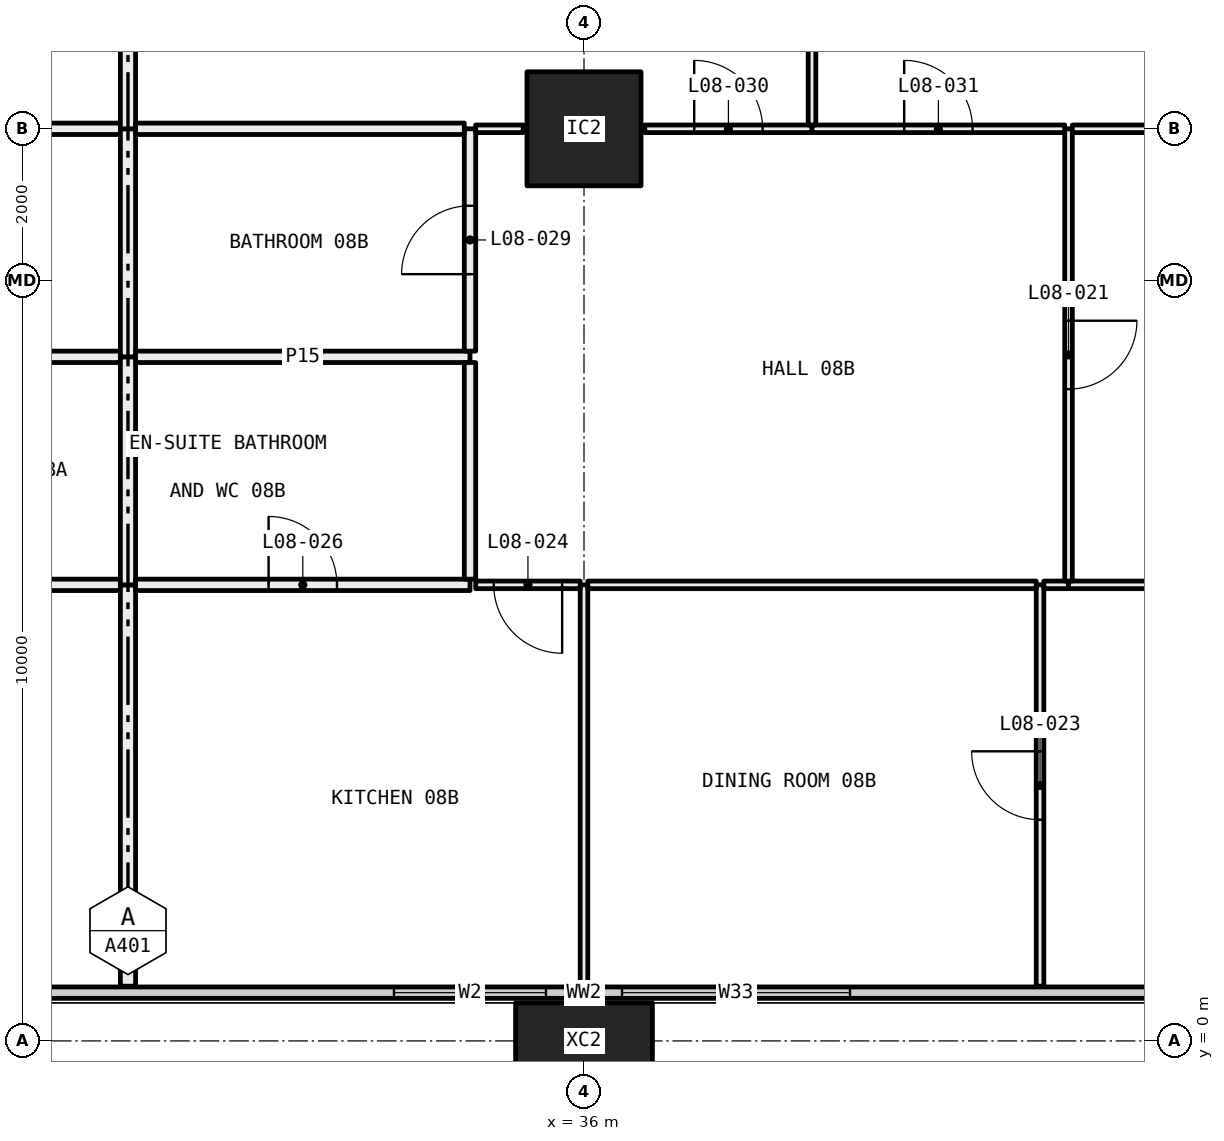
"""IFC4 building model, lengths in metres.
Left out: names, types, materials, properties, quantities, classifications, styles, units other than length and angle.
Written with IfcOpenShell. Run it as: python <this file> out.ifc"""

import sys

from ifc_helpers import new_model, si_unit, direction, frame, frame_2d, origin, origin_2d, place, context, subcontext, project, spatial, rectangle, hollow_rectangle, extrude, element, fill, save


model = new_model("IFC4")
c1 = context("Model", 3, precision=1e-05, world=origin(), true_north=direction((0.0, 1.0)))
c2 = subcontext(c1, "Body", "Model", "MODEL_VIEW")
j1 = project(units=[si_unit("LENGTHUNIT", "METRE"), si_unit("PLANEANGLEUNIT", "RADIAN")], contexts=[c1])
p1 = place(None, origin())
s1 = spatial("IfcSite", under=j1, at=p1, CompositionType="ELEMENT")
p2 = place(p1, origin())
s2 = spatial("IfcBuilding", under=s1, at=p2, CompositionType="ELEMENT")
p3 = place(p2, frame((0.0, 0.0, 40.35)))
s3 = spatial("IfcBuildingStorey", under=s2, at=p3, CompositionType="ELEMENT", Elevation=40.35)
p4 = place(p3, frame((36.0, 0.0, -0.4), z_axis=(0.0, 0.0, 1.0), x_axis=(1.0, 0.0, 0.0)))
e1 = element("IfcColumn", 1, at=p4, inside=s3, PredefinedType="COLUMN", context=c2, shape_type="SweptSolid", body=[
    extrude(hollow_rectangle(XDim=1.8, YDim=1.0, WallThickness=0.07, at=origin_2d()), origin(), (0.0, 0.0, 1.0), 3.45),
])
p5 = place(p3, frame((36.0, 12.0, 0.0), z_axis=(0.0, 0.0, 1.0), x_axis=(1.0, 0.0, 0.0)))
e2 = element("IfcColumn", 2, at=p5, inside=s3, PredefinedType="COLUMN", context=c2, shape_type="SweptSolid", body=[
    extrude(hollow_rectangle(XDim=1.5, YDim=1.5, WallThickness=0.065, at=origin_2d()), origin(), (0.0, 0.0, 1.0), 3.05),
])
p6 = place(p3, frame((6.56, 0.635, 0.0), z_axis=(0.0, 0.0, 1.0), x_axis=(1.0, 0.0, 0.0)))
e3 = element("IfcWall", 3, at=p6, inside=s3, PredefinedType="ELEMENTEDWALL", context=c2, shape_type="SweptSolid", body=[
    extrude(rectangle(XDim=58.88, YDim=0.15, at=frame_2d((29.44, 0.0))), origin(), (0.0, 0.0, 1.0), 3.05),
])
p7 = place(p6, frame((0.44, 0.0, 0.45)))
e4 = element("IfcOpeningElement", 4, at=p7, cuts=e3, PredefinedType="OPENING", context=c2, shape_type="SweptSolid", body=[
    extrude(rectangle(XDim=4.5, YDim=2.55, at=frame_2d((2.25, 1.275))), frame((0.0, 0.085, 0.0), z_axis=(0.0, -1.0, 0.0), x_axis=(1.0, 0.0, 0.0)), (0.0, 0.0, 1.0), 0.17),
])
p8 = place(p6, frame((5.94, 0.0, 0.45)))
e5 = element("IfcOpeningElement", 5, at=p8, cuts=e3, PredefinedType="OPENING", context=c2, shape_type="SweptSolid", body=[
    extrude(rectangle(XDim=3.0, YDim=2.55, at=frame_2d((1.5, 1.275))), frame((0.0, 0.085, 0.0), z_axis=(0.0, -1.0, 0.0), x_axis=(1.0, 0.0, 0.0)), (0.0, 0.0, 1.0), 0.17),
])
p9 = place(p6, frame((13.94, 0.0, 0.45)))
e6 = element("IfcOpeningElement", 6, at=p9, cuts=e3, PredefinedType="OPENING", context=c2, shape_type="SweptSolid", body=[
    extrude(rectangle(XDim=3.0, YDim=2.55, at=frame_2d((1.5, 1.275))), frame((0.0, 0.085, 0.0), z_axis=(0.0, -1.0, 0.0), x_axis=(1.0, 0.0, 0.0)), (0.0, 0.0, 1.0), 0.17),
])
p10 = place(p6, frame((17.94, 0.0, 0.45)))
e7 = element("IfcOpeningElement", 7, at=p10, cuts=e3, PredefinedType="OPENING", context=c2, shape_type="SweptSolid", body=[
    extrude(rectangle(XDim=3.0, YDim=2.55, at=frame_2d((1.5, 1.275))), frame((0.0, 0.085, 0.0), z_axis=(0.0, -1.0, 0.0), x_axis=(1.0, 0.0, 0.0)), (0.0, 0.0, 1.0), 0.17),
])
p11 = place(p6, frame((26.94, 0.0, 0.45)))
e8 = element("IfcOpeningElement", 8, at=p11, cuts=e3, PredefinedType="OPENING", context=c2, shape_type="SweptSolid", body=[
    extrude(rectangle(XDim=2.0, YDim=2.55, at=frame_2d((1.0, 1.275))), frame((0.0, 0.085, 0.0), z_axis=(0.0, -1.0, 0.0), x_axis=(1.0, 0.0, 0.0)), (0.0, 0.0, 1.0), 0.17),
])
p12 = place(p6, frame((29.94, 0.0, 0.45)))
e9 = element("IfcOpeningElement", 9, at=p12, cuts=e3, PredefinedType="OPENING", context=c2, shape_type="SweptSolid", body=[
    extrude(rectangle(XDim=3.0, YDim=2.55, at=frame_2d((1.5, 1.275))), frame((0.0, 0.085, 0.0), z_axis=(0.0, -1.0, 0.0), x_axis=(1.0, 0.0, 0.0)), (0.0, 0.0, 1.0), 0.17),
])
p13 = place(p6, frame((37.94, 0.0, 0.45)))
e10 = element("IfcOpeningElement", 10, at=p13, cuts=e3, PredefinedType="OPENING", context=c2, shape_type="SweptSolid", body=[
    extrude(rectangle(XDim=3.0, YDim=2.55, at=frame_2d((1.5, 1.275))), frame((0.0, 0.085, 0.0), z_axis=(0.0, -1.0, 0.0), x_axis=(1.0, 0.0, 0.0)), (0.0, 0.0, 1.0), 0.17),
])
p14 = place(p6, frame((41.94, 0.0, 0.45)))
e11 = element("IfcOpeningElement", 11, at=p14, cuts=e3, PredefinedType="OPENING", context=c2, shape_type="SweptSolid", body=[
    extrude(rectangle(XDim=3.0, YDim=2.55, at=frame_2d((1.5, 1.275))), frame((0.0, 0.085, 0.0), z_axis=(0.0, -1.0, 0.0), x_axis=(1.0, 0.0, 0.0)), (0.0, 0.0, 1.0), 0.17),
])
p15 = place(p6, frame((50.94, 0.0, 0.45)))
e12 = element("IfcOpeningElement", 12, at=p15, cuts=e3, PredefinedType="OPENING", context=c2, shape_type="SweptSolid", body=[
    extrude(rectangle(XDim=2.0, YDim=2.55, at=frame_2d((1.0, 1.275))), frame((0.0, 0.085, 0.0), z_axis=(0.0, -1.0, 0.0), x_axis=(1.0, 0.0, 0.0)), (0.0, 0.0, 1.0), 0.17),
])
p16 = place(p6, frame((53.94, 0.0, 0.45)))
e13 = element("IfcOpeningElement", 13, at=p16, cuts=e3, PredefinedType="OPENING", context=c2, shape_type="SweptSolid", body=[
    extrude(rectangle(XDim=4.5, YDim=2.55, at=frame_2d((2.25, 1.275))), frame((0.0, 0.085, 0.0), z_axis=(0.0, -1.0, 0.0), x_axis=(1.0, 0.0, 0.0)), (0.0, 0.0, 1.0), 0.17),
])
p17 = place(p3, frame((29.9, 6.0, 0.0), z_axis=(0.0, 0.0, 1.0), x_axis=(-1.0, 0.0, 0.0)))
e14 = element("IfcWall", 14, at=p17, inside=s3, PredefinedType="PARTITIONING", context=c2, shape_type="SweptSolid", body=[
    extrude(rectangle(XDim=4.4, YDim=0.15, at=frame_2d((2.2, 0.0))), origin(), (0.0, 0.0, 1.0), 3.05),
])
p18 = place(p3, frame((30.0, 0.72, 0.0), z_axis=(0.0, 0.0, 1.0), x_axis=(0.0, 1.0, 0.0)))
e15 = element("IfcWall", 15, at=p18, inside=s3, PredefinedType="PARTITIONING", context=c2, shape_type="SweptSolid", body=[
    extrude(rectangle(XDim=5.28, YDim=0.2, at=frame_2d((2.64, 0.0))), origin(), (0.0, 0.0, 1.0), 3.05),
])
p19 = place(p3, frame((29.9, 9.0, 0.0), z_axis=(0.0, 0.0, 1.0), x_axis=(-1.0, 0.0, 0.0)))
e16 = element("IfcWall", 16, at=p19, inside=s3, PredefinedType="PARTITIONING", context=c2, shape_type="SweptSolid", body=[
    extrude(rectangle(XDim=4.325, YDim=0.15, at=frame_2d((2.163, 0.0))), origin(), (0.0, 0.0, 1.0), 3.05),
])
p20 = place(p3, frame((30.0, 6.0, 0.0), z_axis=(0.0, 0.0, 1.0), x_axis=(0.0, 1.0, 0.0)))
e17 = element("IfcWall", 17, at=p20, inside=s3, PredefinedType="PARTITIONING", context=c2, shape_type="SweptSolid", body=[
    extrude(rectangle(XDim=3.0, YDim=0.2, at=frame_2d((1.5, 0.0))), origin(), (0.0, 0.0, 1.0), 3.05),
])
p21 = place(p3, frame((29.9, 12.0, 0.0), z_axis=(0.0, 0.0, 1.0), x_axis=(-1.0, 0.0, 0.0)))
e18 = element("IfcWall", 18, at=p21, inside=s3, PredefinedType="PARTITIONING", context=c2, shape_type="SweptSolid", body=[
    extrude(rectangle(XDim=4.325, YDim=0.15, at=frame_2d((2.163, 0.0))), origin(), (0.0, 0.0, 1.0), 2.45),
])
p22 = place(p3, frame((30.0, 9.0, 0.0), z_axis=(0.0, 0.0, 1.0), x_axis=(0.0, 1.0, 0.0)))
e19 = element("IfcWall", 19, at=p22, inside=s3, PredefinedType="PARTITIONING", context=c2, shape_type="SweptSolid", body=[
    extrude(rectangle(XDim=3.0, YDim=0.2, at=frame_2d((1.5, 0.0))), origin(), (0.0, 0.0, 1.0), 2.45),
])
p23 = place(p3, frame((30.0, 12.0, 0.0), z_axis=(0.0, 0.0, 1.0), x_axis=(0.0, 1.0, 0.0)))
e20 = element("IfcWall", 20, at=p23, inside=s3, PredefinedType="PARTITIONING", context=c2, shape_type="SweptSolid", body=[
    extrude(rectangle(XDim=6.0, YDim=0.2, at=frame_2d((3.0, 0.0))), origin(), (0.0, 0.0, 1.0), 2.45),
])
p24 = place(p3, frame((36.0, 0.72, 0.0), z_axis=(0.0, 0.0, 1.0), x_axis=(0.0, 1.0, 0.0)))
e21 = element("IfcWall", 21, at=p24, inside=s3, PredefinedType="PARTITIONING", context=c2, shape_type="SweptSolid", body=[
    extrude(rectangle(XDim=5.28, YDim=0.1, at=frame_2d((2.64, 0.0))), origin(), (0.0, 0.0, 1.0), 2.45),
])
p25 = place(p3, frame((34.5, 6.0, 0.0), z_axis=(0.0, 0.0, 1.0), x_axis=(-1.0, 0.0, 0.0)))
e22 = element("IfcWall", 22, at=p25, inside=s3, PredefinedType="PARTITIONING", context=c2, shape_type="SweptSolid", body=[
    extrude(rectangle(XDim=4.4, YDim=0.15, at=frame_2d((2.2, 0.0))), origin(), (0.0, 0.0, 1.0), 3.05),
])
p26 = place(p25, frame((1.75, 0.0, 0.0)))
e23 = element("IfcOpeningElement", 23, at=p26, cuts=e22, PredefinedType="OPENING", context=c2, shape_type="SweptSolid", body=[
    extrude(rectangle(XDim=0.9, YDim=2.1, at=frame_2d((0.45, 1.05))), frame((0.0, 0.085, 0.0), z_axis=(0.0, -1.0, 0.0), x_axis=(1.0, 0.0, 0.0)), (0.0, 0.0, 1.0), 0.17),
])
p27 = place(p3, frame((35.95, 6.0, 0.0), z_axis=(0.0, 0.0, 1.0), x_axis=(-1.0, 0.0, 0.0)))
e24 = element("IfcWall", 24, at=p27, inside=s3, PredefinedType="PARTITIONING", context=c2, shape_type="SweptSolid", body=[
    extrude(rectangle(XDim=1.375, YDim=0.1, at=frame_2d((0.688, 0.0))), origin(), (0.0, 0.0, 1.0), 2.45),
])
p28 = place(p27, frame((0.238, 0.0, 0.0)))
e25 = element("IfcOpeningElement", 25, at=p28, cuts=e24, PredefinedType="OPENING", context=c2, shape_type="SweptSolid", body=[
    extrude(rectangle(XDim=0.9, YDim=2.1, at=frame_2d((0.45, 1.05))), frame((0.0, 0.06, 0.0), z_axis=(0.0, -1.0, 0.0), x_axis=(1.0, 0.0, 0.0)), (0.0, 0.0, 1.0), 0.12),
])
p29 = place(p3, frame((42.0, 0.72, 0.0), z_axis=(0.0, 0.0, 1.0), x_axis=(0.0, 1.0, 0.0)))
e26 = element("IfcWall", 26, at=p29, inside=s3, PredefinedType="PARTITIONING", context=c2, shape_type="SweptSolid", body=[
    extrude(rectangle(XDim=5.28, YDim=0.1, at=frame_2d((2.64, 0.0))), origin(), (0.0, 0.0, 1.0), 3.05),
])
p30 = place(p29, frame((2.19, 0.0, 0.0)))
e27 = element("IfcOpeningElement", 27, at=p30, cuts=e26, PredefinedType="OPENING", context=c2, shape_type="SweptSolid", body=[
    extrude(rectangle(XDim=0.9, YDim=2.1, at=frame_2d((0.45, 1.05))), frame((0.0, 0.06, 0.0), z_axis=(0.0, -1.0, 0.0), x_axis=(1.0, 0.0, 0.0)), (0.0, 0.0, 1.0), 0.12),
])
p31 = place(p3, frame((41.95, 6.0, 0.0), z_axis=(0.0, 0.0, 1.0), x_axis=(-1.0, 0.0, 0.0)))
e28 = element("IfcWall", 28, at=p31, inside=s3, PredefinedType="PARTITIONING", context=c2, shape_type="SweptSolid", body=[
    extrude(rectangle(XDim=5.9, YDim=0.1, at=frame_2d((2.95, 0.0))), origin(), (0.0, 0.0, 1.0), 2.45),
])
p32 = place(p3, frame((42.375, 6.0, 0.0), z_axis=(0.0, 0.0, 1.0), x_axis=(-1.0, 0.0, 0.0)))
e29 = element("IfcWall", 29, at=p32, inside=s3, PredefinedType="PARTITIONING", context=c2, shape_type="SweptSolid", body=[
    extrude(rectangle(XDim=0.325, YDim=0.1, at=frame_2d((0.163, 0.0))), origin(), (0.0, 0.0, 1.0), 3.05),
])
p33 = place(p3, frame((47.9, 6.0, 0.0), z_axis=(0.0, 0.0, 1.0), x_axis=(-1.0, 0.0, 0.0)))
e30 = element("IfcWall", 30, at=p33, inside=s3, PredefinedType="PARTITIONING", context=c2, shape_type="SweptSolid", body=[
    extrude(rectangle(XDim=5.525, YDim=0.1, at=frame_2d((2.762, 0.0))), origin(), (0.0, 0.0, 1.0), 3.05),
])
p34 = place(p33, frame((2.312, 0.0, 0.0)))
e31 = element("IfcOpeningElement", 31, at=p34, cuts=e30, PredefinedType="OPENING", context=c2, shape_type="SweptSolid", body=[
    extrude(rectangle(XDim=0.9, YDim=2.1, at=frame_2d((0.45, 1.05))), frame((0.0, 0.06, 0.0), z_axis=(0.0, -1.0, 0.0), x_axis=(1.0, 0.0, 0.0)), (0.0, 0.0, 1.0), 0.12),
])
p35 = place(p3, frame((34.5, 9.0, 0.0), z_axis=(0.0, 0.0, 1.0), x_axis=(-1.0, 0.0, 0.0)))
e32 = element("IfcWall", 32, at=p35, inside=s3, PredefinedType="PARTITIONING", context=c2, shape_type="SweptSolid", body=[
    extrude(rectangle(XDim=4.4, YDim=0.15, at=frame_2d((2.2, 0.0))), origin(), (0.0, 0.0, 1.0), 3.05),
])
p36 = place(p3, frame((34.5, 6.075, 0.0), z_axis=(0.0, 0.0, 1.0), x_axis=(0.0, 1.0, 0.0)))
e33 = element("IfcWall", 33, at=p36, inside=s3, PredefinedType="PARTITIONING", context=c2, shape_type="SweptSolid", body=[
    extrude(rectangle(XDim=2.85, YDim=0.15, at=frame_2d((1.425, 0.0))), origin(), (0.0, 0.0, 1.0), 3.05),
])
p37 = place(p3, frame((34.5, 9.075, 0.0), z_axis=(0.0, 0.0, 1.0), x_axis=(0.0, 1.0, 0.0)))
e34 = element("IfcWall", 34, at=p37, inside=s3, PredefinedType="PARTITIONING", context=c2, shape_type="SweptSolid", body=[
    extrude(rectangle(XDim=2.925, YDim=0.15, at=frame_2d((1.462, 0.0))), origin(), (0.0, 0.0, 1.0), 2.45),
])
p38 = place(p37, frame((1.012, 0.0, 0.0)))
e35 = element("IfcOpeningElement", 35, at=p38, cuts=e34, PredefinedType="OPENING", context=c2, shape_type="SweptSolid", body=[
    extrude(rectangle(XDim=0.9, YDim=2.1, at=frame_2d((0.45, 1.05))), frame((0.0, 0.085, 0.0), z_axis=(0.0, -1.0, 0.0), x_axis=(1.0, 0.0, 0.0)), (0.0, 0.0, 1.0), 0.17),
])
p39 = place(p3, frame((34.425, 12.0, 0.0), z_axis=(0.0, 0.0, 1.0), x_axis=(-1.0, 0.0, 0.0)))
e36 = element("IfcWall", 36, at=p39, inside=s3, PredefinedType="PARTITIONING", context=c2, shape_type="SweptSolid", body=[
    extrude(rectangle(XDim=4.325, YDim=0.15, at=frame_2d((2.163, 0.0))), origin(), (0.0, 0.0, 1.0), 2.45),
])
p40 = place(p3, frame((42.375, 6.05, 0.0), z_axis=(0.0, 0.0, 1.0), x_axis=(0.0, 1.0, 0.0)))
e37 = element("IfcWall", 37, at=p40, inside=s3, PredefinedType="PARTITIONING", context=c2, shape_type="SweptSolid", body=[
    extrude(rectangle(XDim=5.95, YDim=0.1, at=frame_2d((2.975, 0.0))), origin(), (0.0, 0.0, 1.0), 2.45),
])
p41 = place(p40, frame((2.525, 0.0, 0.0)))
e38 = element("IfcOpeningElement", 38, at=p41, cuts=e37, PredefinedType="OPENING", context=c2, shape_type="SweptSolid", body=[
    extrude(rectangle(XDim=0.9, YDim=2.1, at=frame_2d((0.45, 1.05))), frame((0.0, 0.06, 0.0), z_axis=(0.0, -1.0, 0.0), x_axis=(1.0, 0.0, 0.0)), (0.0, 0.0, 1.0), 0.12),
])
p42 = place(p3, frame((35.2, 12.0, 0.0), z_axis=(0.0, 0.0, 1.0), x_axis=(-1.0, 0.0, 0.0)))
e39 = element("IfcWall", 39, at=p42, inside=s3, PredefinedType="PARTITIONING", context=c2, shape_type="SweptSolid", body=[
    extrude(rectangle(XDim=0.625, YDim=0.1, at=frame_2d((0.312, 0.0))), origin(), (0.0, 0.0, 1.0), 2.45),
])
p43 = place(p3, frame((39.0, 12.0, 0.0), z_axis=(0.0, 0.0, 1.0), x_axis=(-1.0, 0.0, 0.0)))
e40 = element("IfcWall", 40, at=p43, inside=s3, PredefinedType="PARTITIONING", context=c2, shape_type="SweptSolid", body=[
    extrude(rectangle(XDim=2.2, YDim=0.1, at=frame_2d((1.1, 0.0))), origin(), (0.0, 0.0, 1.0), 2.45),
])
p44 = place(p43, frame((0.65, 0.0, 0.0)))
e41 = element("IfcOpeningElement", 41, at=p44, cuts=e40, PredefinedType="OPENING", context=c2, shape_type="SweptSolid", body=[
    extrude(rectangle(XDim=0.9, YDim=2.1, at=frame_2d((0.45, 1.05))), frame((0.0, 0.06, 0.0), z_axis=(0.0, -1.0, 0.0), x_axis=(1.0, 0.0, 0.0)), (0.0, 0.0, 1.0), 0.12),
])
p45 = place(p3, frame((42.325, 12.0, 0.0), z_axis=(0.0, 0.0, 1.0), x_axis=(-1.0, 0.0, 0.0)))
e42 = element("IfcWall", 42, at=p45, inside=s3, PredefinedType="PARTITIONING", context=c2, shape_type="SweptSolid", body=[
    extrude(rectangle(XDim=3.325, YDim=0.1, at=frame_2d((1.663, 0.0))), origin(), (0.0, 0.0, 1.0), 2.45),
])
p46 = place(p45, frame((1.212, 0.0, 0.0)))
e43 = element("IfcOpeningElement", 43, at=p46, cuts=e42, PredefinedType="OPENING", context=c2, shape_type="SweptSolid", body=[
    extrude(rectangle(XDim=0.9, YDim=2.1, at=frame_2d((0.45, 1.05))), frame((0.0, 0.06, 0.0), z_axis=(0.0, -1.0, 0.0), x_axis=(1.0, 0.0, 0.0)), (0.0, 0.0, 1.0), 0.12),
])
p47 = place(p3, frame((43.5, 12.0, 0.0), z_axis=(0.0, 0.0, 1.0), x_axis=(-1.0, 0.0, 0.0)))
e44 = element("IfcWall", 44, at=p47, inside=s3, PredefinedType="PARTITIONING", context=c2, shape_type="SweptSolid", body=[
    extrude(rectangle(XDim=1.075, YDim=0.1, at=frame_2d((0.538, 0.0))), origin(), (0.0, 0.0, 1.0), 2.45),
])
p48 = place(p3, frame((39.0, 12.05, 0.0), z_axis=(0.0, 0.0, 1.0), x_axis=(0.0, 1.0, 0.0)))
e45 = element("IfcWall", 45, at=p48, inside=s3, PredefinedType="PARTITIONING", context=c2, shape_type="SweptSolid", body=[
    extrude(rectangle(XDim=5.85, YDim=0.1, at=frame_2d((2.925, 0.0))), origin(), (0.0, 0.0, 1.0), 2.45),
])
p49 = place(p11, origin())
e46 = element("IfcWindow", 46, at=p49, inside=s3, PartitioningType="SINGLE_PANEL", PredefinedType="WINDOW", context=c2, shape_type="SweptSolid", body=[
    extrude(rectangle(XDim=2.0, YDim=2.55, at=frame_2d((1.0, 1.275))), frame((0.0, 0.03, 0.0), z_axis=(0.0, -1.0, 0.0), x_axis=(1.0, 0.0, 0.0)), (0.0, 0.0, 1.0), 0.06),
])
fill(e8, e46)
p50 = place(p12, origin())
e47 = element("IfcWindow", 47, at=p50, inside=s3, PartitioningType="SINGLE_PANEL", PredefinedType="WINDOW", context=c2, shape_type="SweptSolid", body=[
    extrude(rectangle(XDim=3.0, YDim=2.55, at=frame_2d((1.5, 1.275))), frame((0.0, 0.03, 0.0), z_axis=(0.0, -1.0, 0.0), x_axis=(1.0, 0.0, 0.0)), (0.0, 0.0, 1.0), 0.06),
])
fill(e9, e47)
p51 = place(p41, frame((0.9, 0.0, 0.0), x_axis=(-1.0, 0.0, 0.0)))
e48 = element("IfcDoor", 48, at=p51, inside=s3, OperationType="SINGLE_SWING_RIGHT", PredefinedType="DOOR", context=c2, shape_type="SweptSolid", body=[
    extrude(rectangle(XDim=0.9, YDim=2.1, at=frame_2d((0.45, 1.05))), frame((0.0, 0.025, 0.0), z_axis=(0.0, -1.0, 0.0), x_axis=(1.0, 0.0, 0.0)), (0.0, 0.0, 1.0), 0.05),
])
fill(e38, e48)
p52 = place(p30, origin())
e49 = element("IfcDoor", 49, at=p52, inside=s3, OperationType="SINGLE_SWING_LEFT", PredefinedType="DOOR", context=c2, shape_type="SweptSolid", body=[
    extrude(rectangle(XDim=0.9, YDim=2.1, at=frame_2d((0.45, 1.05))), frame((0.0, 0.025, 0.0), z_axis=(0.0, -1.0, 0.0), x_axis=(1.0, 0.0, 0.0)), (0.0, 0.0, 1.0), 0.05),
])
fill(e27, e49)
p53 = place(p28, origin())
e50 = element("IfcDoor", 50, at=p53, inside=s3, OperationType="SINGLE_SWING_RIGHT", PredefinedType="DOOR", context=c2, shape_type="SweptSolid", body=[
    extrude(rectangle(XDim=0.9, YDim=2.1, at=frame_2d((0.45, 1.05))), frame((0.0, 0.025, 0.0), z_axis=(0.0, -1.0, 0.0), x_axis=(1.0, 0.0, 0.0)), (0.0, 0.0, 1.0), 0.05),
])
fill(e25, e50)
p54 = place(p26, frame((0.9, 0.0, 0.0), x_axis=(-1.0, 0.0, 0.0)))
e51 = element("IfcDoor", 51, at=p54, inside=s3, OperationType="SINGLE_SWING_RIGHT", PredefinedType="DOOR", context=c2, shape_type="SweptSolid", body=[
    extrude(rectangle(XDim=0.9, YDim=2.1, at=frame_2d((0.45, 1.05))), frame((0.0, 0.025, 0.0), z_axis=(0.0, -1.0, 0.0), x_axis=(1.0, 0.0, 0.0)), (0.0, 0.0, 1.0), 0.05),
])
fill(e23, e51)
p55 = place(p38, origin())
e52 = element("IfcDoor", 52, at=p55, inside=s3, OperationType="SINGLE_SWING_RIGHT", PredefinedType="DOOR", context=c2, shape_type="SweptSolid", body=[
    extrude(rectangle(XDim=0.9, YDim=2.1, at=frame_2d((0.45, 1.05))), frame((0.0, 0.025, 0.0), z_axis=(0.0, -1.0, 0.0), x_axis=(1.0, 0.0, 0.0)), (0.0, 0.0, 1.0), 0.05),
])
fill(e35, e52)
p56 = place(p44, frame((0.9, 0.0, 0.0), x_axis=(-1.0, 0.0, 0.0)))
e53 = element("IfcDoor", 53, at=p56, inside=s3, OperationType="SINGLE_SWING_RIGHT", PredefinedType="DOOR", context=c2, shape_type="SweptSolid", body=[
    extrude(rectangle(XDim=0.9, YDim=2.1, at=frame_2d((0.45, 1.05))), frame((0.0, 0.025, 0.0), z_axis=(0.0, -1.0, 0.0), x_axis=(1.0, 0.0, 0.0)), (0.0, 0.0, 1.0), 0.05),
])
fill(e41, e53)
p57 = place(p46, frame((0.9, 0.0, 0.0), x_axis=(-1.0, 0.0, 0.0)))
e54 = element("IfcDoor", 54, at=p57, inside=s3, OperationType="SINGLE_SWING_RIGHT", PredefinedType="DOOR", context=c2, shape_type="SweptSolid", body=[
    extrude(rectangle(XDim=0.9, YDim=2.1, at=frame_2d((0.45, 1.05))), frame((0.0, 0.025, 0.0), z_axis=(0.0, -1.0, 0.0), x_axis=(1.0, 0.0, 0.0)), (0.0, 0.0, 1.0), 0.05),
])
fill(e43, e54)
save(model, sys.argv[1])
